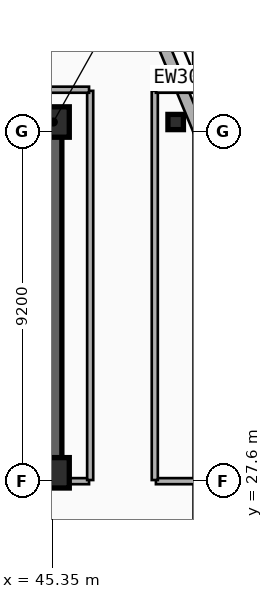
"""IFC4 building model, lengths in metres.
Left out: names, types, materials, properties, quantities, classifications, styles, units other than length and angle.
Written with IfcOpenShell. Run it as: python <this file> out.ifc"""

import sys

from ifc_helpers import new_model, si_unit, direction, frame, frame_2d, origin, origin_2d, place, context, subcontext, project, spatial, rectangle, i_section, extrude, element, save


model = new_model("IFC4")
c1 = context("Model", 3, precision=1e-05, world=origin(), true_north=direction((0.0, 1.0)))
c2 = subcontext(c1, "Body", "Model", "MODEL_VIEW")
j1 = project(units=[si_unit("LENGTHUNIT", "METRE"), si_unit("PLANEANGLEUNIT", "RADIAN")], contexts=[c1])
p1 = place(None, origin())
s1 = spatial("IfcSite", under=j1, at=p1, CompositionType="ELEMENT")
p2 = place(p1, origin())
s2 = spatial("IfcBuilding", under=s1, at=p2, CompositionType="ELEMENT")
p3 = place(p2, frame((0.0, 0.0, 254.7)))
s3 = spatial("IfcBuildingStorey", under=s2, at=p3, CompositionType="ELEMENT", Elevation=254.7)
p4 = place(p3, frame((12.15, 37.05, 0.0), z_axis=(0.0, 0.0, 1.0), x_axis=(1.0, 0.0, 0.0)))
e1 = element("IfcWall", 1, at=p4, inside=s3, PredefinedType="SHEAR", context=c2, shape_type="SweptSolid", body=[
    extrude(rectangle(XDim=33.23, YDim=0.45, at=frame_2d((16.615, 0.0))), origin(), (0.0, 0.0, 1.0), 3.7),
])
p5 = place(p3, frame((45.38, 27.82, 0.0), z_axis=(0.0, 0.0, 1.0), x_axis=(-1.0, 0.0, 0.0)))
e2 = element("IfcWall", 2, at=p5, inside=s3, PredefinedType="SHEAR", context=c2, shape_type="SweptSolid", body=[
    extrude(rectangle(XDim=12.23, YDim=0.45, at=frame_2d((6.115, 0.0))), origin(), (0.0, 0.0, 1.0), 3.7),
])
p6 = place(p5, frame((9.93, 0.0, 0.0)))
e3 = element("IfcOpeningElement", 3, at=p6, cuts=e2, PredefinedType="OPENING", context=c2, shape_type="SweptSolid", body=[
    extrude(rectangle(XDim=1.1, YDim=2.15, at=frame_2d((0.55, 1.075))), frame((0.0, 0.235, 0.0), z_axis=(0.0, -1.0, 0.0), x_axis=(1.0, 0.0, 0.0)), (0.0, 0.0, 1.0), 0.47),
])
p7 = place(p5, frame((6.23, 0.0, 0.0)))
e4 = element("IfcOpeningElement", 4, at=p7, cuts=e2, PredefinedType="OPENING", context=c2, shape_type="SweptSolid", body=[
    extrude(rectangle(XDim=1.1, YDim=2.15, at=frame_2d((0.55, 1.075))), frame((0.0, 0.235, 0.0), z_axis=(0.0, -1.0, 0.0), x_axis=(1.0, 0.0, 0.0)), (0.0, 0.0, 1.0), 0.47),
])
p8 = place(p3, frame((45.38, 28.045, 0.0), z_axis=(0.0, 0.0, 1.0), x_axis=(0.0, 1.0, 0.0)))
e5 = element("IfcWall", 5, at=p8, inside=s3, PredefinedType="SHEAR", context=c2, shape_type="SweptSolid", body=[
    extrude(rectangle(XDim=8.78, YDim=0.45, at=frame_2d((4.39, 0.0))), origin(), (0.0, 0.0, 1.0), 3.7),
])
for number, where, z_axis, x_axis in (
    (6, (45.4, 27.82, 0.0), (0.0, 0.0, 1.0), (1.0, 0.0, 0.0)),
    (7, (45.4, 37.05, 0.0), (0.0, 0.0, 1.0), (1.0, 0.0, 0.0)),
):
    element("IfcColumn", number, at=place(p3, frame(where, z_axis=z_axis, x_axis=x_axis)), inside=s3, PredefinedType="COLUMN", context=c2, shape_type="SweptSolid", body=[
        extrude(rectangle(XDim=0.8, YDim=0.8, at=origin_2d()), origin(), (0.0, 0.0, 1.0), 3.7),
    ])
p9 = place(p3, frame((48.6, 37.05, 0.0), z_axis=(0.0, 0.0, 1.0), x_axis=(1.0, 0.0, 0.0)))
e8 = element("IfcColumn", 8, at=p9, inside=s3, PredefinedType="COLUMN", context=c2, shape_type="SweptSolid", body=[
    extrude(i_section(OverallWidth=0.408, OverallDepth=0.4, WebThickness=0.025, FlangeThickness=0.039, FilletRadius=0.015, at=origin_2d()), origin(), (0.0, 0.0, 1.0), 3.7),
])
p10 = place(p3, frame((48.042, 39.643, 0.0), z_axis=(0.0, 0.0, 1.0), x_axis=(0.382704529509, -0.923870793506, 0.0)))
e9 = element("IfcWall", 9, at=p10, inside=s3, PredefinedType="SOLIDWALL", context=c2, shape_type="SweptSolid", body=[
    extrude(rectangle(XDim=3.077, YDim=0.3, at=frame_2d((1.538, 0.0))), origin(), (0.0, 0.0, 1.0), 3.42),
])
p11 = place(p3, frame((45.41, 27.6, 0.0), z_axis=(0.0, 0.0, 1.0), x_axis=(1.0, 0.0, 0.0)))
e10 = element("IfcWall", 10, at=p11, inside=s3, PredefinedType="PARTITIONING", context=c2, shape_type="SweptSolid", body=[
    extrude(rectangle(XDim=0.91, YDim=0.16, at=frame_2d((0.455, 0.0))), origin(), (0.0, 0.0, 1.0), 2.49),
])
p12 = place(p3, frame((48.08, 27.6, 0.0), z_axis=(0.0, 0.0, 1.0), x_axis=(1.0, 0.0, 0.0)))
e11 = element("IfcWall", 11, at=p12, inside=s3, PredefinedType="PARTITIONING", context=c2, shape_type="SweptSolid", body=[
    extrude(rectangle(XDim=1.03, YDim=0.16, at=frame_2d((0.515, 0.0))), origin(), (0.0, 0.0, 1.0), 3.42),
])
for number, where, z_axis, x_axis in (
    (12, (46.35, 27.63, 0.0), (0.0, 0.0, 1.0), (0.0, 1.0, 0.0)),
    (13, (48.05, 27.63, 0.0), (0.0, 0.0, 1.0), (0.0, 1.0, 0.0)),
):
    element("IfcWall", number, at=place(p3, frame(where, z_axis=z_axis, x_axis=x_axis)), inside=s3, PredefinedType="PARTITIONING", context=c2, shape_type="SweptSolid", body=[
        extrude(rectangle(XDim=10.24, YDim=0.16, at=frame_2d((5.12, 0.0))), origin(), (0.0, 0.0, 1.0), 2.9),
    ])
p13 = place(p3, frame((11.28, 37.9, 0.0), z_axis=(0.0, 0.0, 1.0), x_axis=(1.0, 0.0, 0.0)))
e14 = element("IfcWall", 14, at=p13, inside=s3, PredefinedType="PARTITIONING", context=c2, shape_type="SweptSolid", body=[
    extrude(rectangle(XDim=35.04, YDim=0.16, at=frame_2d((17.52, 0.0))), origin(), (0.0, 0.0, 1.0), 3.42),
])
p14 = place(p3, frame((48.08, 37.9, 0.0), z_axis=(0.0, 0.0, 1.0), x_axis=(1.0, 0.0, 0.0)))
e15 = element("IfcWall", 15, at=p14, inside=s3, PredefinedType="PARTITIONING", context=c2, shape_type="SweptSolid", body=[
    extrude(rectangle(XDim=1.03, YDim=0.16, at=frame_2d((0.515, 0.0))), origin(), (0.0, 0.0, 1.0), 3.42),
])
save(model, sys.argv[1])
